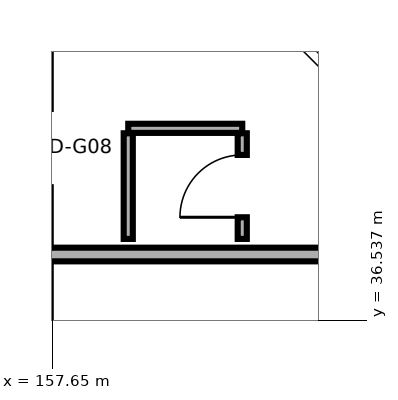
"""IFC4 building model, lengths in metres.
Left out: names, types, materials, properties, quantities, classifications, styles, units other than length and angle.
Written with IfcOpenShell. Run it as: python <this file> out.ifc"""

import sys

from ifc_helpers import new_model, si_unit, direction, frame, frame_2d, origin, place, context, subcontext, project, spatial, rectangle, extrude, element, fill, save


model = new_model("IFC4")
c1 = context("Model", 3, precision=1e-05, world=origin(), true_north=direction((0.0, 1.0)))
c2 = subcontext(c1, "Body", "Model", "MODEL_VIEW")
j1 = project(units=[si_unit("LENGTHUNIT", "METRE"), si_unit("PLANEANGLEUNIT", "RADIAN")], contexts=[c1])
p1 = place(None, origin())
s1 = spatial("IfcSite", under=j1, at=p1, CompositionType="ELEMENT")
p2 = place(p1, origin())
s2 = spatial("IfcBuilding", under=s1, at=p2, CompositionType="ELEMENT")
p3 = place(p2, frame((0.0, 0.0, 38.5)))
s3 = spatial("IfcBuildingStorey", under=s2, at=p3, CompositionType="ELEMENT", Elevation=38.5)
p4 = place(p3, frame((157.55, 37.4, 0.0), z_axis=(0.0, 0.0, 1.0), x_axis=(1.0, 0.0, 0.0)))
e1 = element("IfcWall", 1, at=p4, inside=s3, PredefinedType="PARTITIONING", context=c2, shape_type="SweptSolid", body=[
    extrude(rectangle(XDim=5.308, YDim=0.18, at=frame_2d((2.654, 0.0))), origin(), (0.0, 0.0, 1.0), 3.15),
])
p5 = place(p3, frame((158.65, 39.06, 0.0), z_axis=(0.0, 0.0, 1.0), x_axis=(1.0, 0.0, 0.0)))
e2 = element("IfcWall", 2, at=p5, inside=s3, PredefinedType="PARTITIONING", context=c2, shape_type="SweptSolid", body=[
    extrude(rectangle(XDim=1.5, YDim=0.12, at=frame_2d((0.75, 0.0))), origin(), (0.0, 0.0, 1.0), 3.15),
])
p6 = place(p3, frame((158.65, 37.605, 0.0), z_axis=(0.0, 0.0, 1.0), x_axis=(0.0, 1.0, 0.0)))
e3 = element("IfcWall", 3, at=p6, inside=s3, PredefinedType="PARTITIONING", context=c2, shape_type="SweptSolid", body=[
    extrude(rectangle(XDim=1.39, YDim=0.12, at=frame_2d((0.695, 0.0))), origin(), (0.0, 0.0, 1.0), 2.735),
])
p7 = place(p3, frame((160.15, 37.605, 0.0), z_axis=(0.0, 0.0, 1.0), x_axis=(0.0, 1.0, 0.0)))
e4 = element("IfcWall", 4, at=p7, inside=s3, PredefinedType="PARTITIONING", context=c2, shape_type="SweptSolid", body=[
    extrude(rectangle(XDim=1.39, YDim=0.12, at=frame_2d((0.695, 0.0))), origin(), (0.0, 0.0, 1.0), 2.735),
])
p8 = place(p7, frame((0.285, 0.0, 0.0)))
e5 = element("IfcOpeningElement", 5, at=p8, cuts=e4, PredefinedType="OPENING", context=c2, shape_type="SweptSolid", body=[
    extrude(rectangle(XDim=0.82, YDim=2.08, at=frame_2d((0.41, 1.04))), frame((0.0, 0.07, 0.0), z_axis=(0.0, -1.0, 0.0), x_axis=(1.0, 0.0, 0.0)), (0.0, 0.0, 1.0), 0.14),
])
p9 = place(p8, origin())
e6 = element("IfcDoor", 6, at=p9, inside=s3, OperationType="SINGLE_SWING_LEFT", PredefinedType="DOOR", context=c2, shape_type="SweptSolid", body=[
    extrude(rectangle(XDim=0.82, YDim=2.08, at=frame_2d((0.41, 1.04))), frame((0.0, 0.025, 0.0), z_axis=(0.0, -1.0, 0.0), x_axis=(1.0, 0.0, 0.0)), (0.0, 0.0, 1.0), 0.05),
])
fill(e5, e6)
save(model, sys.argv[1])
